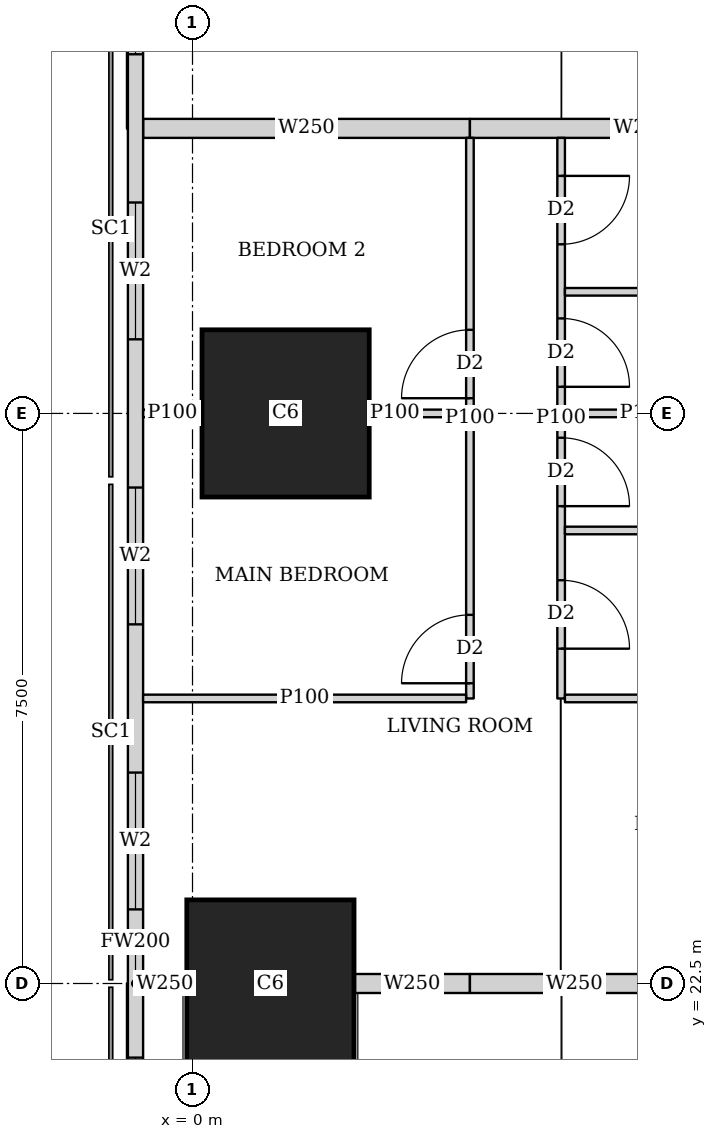
"""IFC4 building model, lengths in metres.
Left out: names, types, materials, properties, quantities, classifications, styles, units other than length and angle.
Written with IfcOpenShell. Run it as: python <this file> out.ifc"""

import sys

from ifc_helpers import new_model, si_unit, direction, frame, frame_2d, origin, origin_2d, place, context, subcontext, project, spatial, rectangle, extrude, element, fill, save


model = new_model("IFC4")
c1 = context("Model", 3, precision=1e-05, world=origin(), true_north=direction((0.0, 1.0)))
c2 = subcontext(c1, "Body", "Model", "MODEL_VIEW")
j1 = project(units=[si_unit("LENGTHUNIT", "METRE"), si_unit("PLANEANGLEUNIT", "RADIAN")], contexts=[c1])
p1 = place(None, origin())
s1 = spatial("IfcSite", under=j1, at=p1, CompositionType="ELEMENT")
p2 = place(p1, origin())
s2 = spatial("IfcBuilding", under=s1, at=p2, CompositionType="ELEMENT")
p3 = place(p2, frame((0.0, 0.0, 81.65)))
s3 = spatial("IfcBuildingStorey", under=s2, at=p3, CompositionType="ELEMENT", Elevation=81.65)
for number, where, z_axis, x_axis in (
    (1, (1.025, 22.5, 0.0), (0.0, 0.0, 1.0), (1.0, 0.0, 0.0)),
    (2, (1.225, 30.0, 0.0), (0.0, 0.0, 1.0), (1.0, 0.0, 0.0)),
):
    element("IfcColumn", number, at=place(p3, frame(where, z_axis=z_axis, x_axis=x_axis)), inside=s3, PredefinedType="COLUMN", context=c2, shape_type="SweptSolid", body=[
        extrude(rectangle(XDim=2.2, YDim=2.2, at=origin_2d()), origin(), (0.0, 0.0, 1.0), 3.75),
    ])
p4 = place(p3, frame((-0.75, 42.837, 0.0), z_axis=(0.0, 0.0, 1.0), x_axis=(0.0, -1.0, 0.0)))
e3 = element("IfcWall", 3, at=p4, inside=s3, PredefinedType="SOLIDWALL", context=c2, shape_type="SweptSolid", body=[
    extrude(rectangle(XDim=40.674, YDim=0.2, at=frame_2d((20.337, 0.0))), origin(), (0.0, 0.0, 1.0), 3.5),
])
p5 = place(p4, frame((1.78, 0.0, 0.9)))
e4 = element("IfcOpeningElement", 4, at=p5, cuts=e3, PredefinedType="OPENING", context=c2, shape_type="SweptSolid", body=[
    extrude(rectangle(XDim=1.8, YDim=1.5, at=frame_2d((0.9, 0.75))), frame((0.0, 0.11, 0.0), z_axis=(0.0, -1.0, 0.0), x_axis=(1.0, 0.0, 0.0)), (0.0, 0.0, 1.0), 0.22),
])
p6 = place(p4, frame((6.312, 0.0, 0.9)))
e5 = element("IfcOpeningElement", 5, at=p6, cuts=e3, PredefinedType="OPENING", context=c2, shape_type="SweptSolid", body=[
    extrude(rectangle(XDim=1.8, YDim=1.5, at=frame_2d((0.9, 0.75))), frame((0.0, 0.11, 0.0), z_axis=(0.0, -1.0, 0.0), x_axis=(1.0, 0.0, 0.0)), (0.0, 0.0, 1.0), 0.22),
])
p7 = place(p4, frame((10.062, 0.0, 0.9)))
e6 = element("IfcOpeningElement", 6, at=p7, cuts=e3, PredefinedType="OPENING", context=c2, shape_type="SweptSolid", body=[
    extrude(rectangle(XDim=1.8, YDim=1.5, at=frame_2d((0.9, 0.75))), frame((0.0, 0.11, 0.0), z_axis=(0.0, -1.0, 0.0), x_axis=(1.0, 0.0, 0.0)), (0.0, 0.0, 1.0), 0.22),
])
p8 = place(p4, frame((13.812, 0.0, 0.9)))
e7 = element("IfcOpeningElement", 7, at=p8, cuts=e3, PredefinedType="OPENING", context=c2, shape_type="SweptSolid", body=[
    extrude(rectangle(XDim=1.8, YDim=1.5, at=frame_2d((0.9, 0.75))), frame((0.0, 0.11, 0.0), z_axis=(0.0, -1.0, 0.0), x_axis=(1.0, 0.0, 0.0)), (0.0, 0.0, 1.0), 0.22),
])
p9 = place(p4, frame((17.562, 0.0, 0.9)))
e8 = element("IfcOpeningElement", 8, at=p9, cuts=e3, PredefinedType="OPENING", context=c2, shape_type="SweptSolid", body=[
    extrude(rectangle(XDim=1.8, YDim=1.5, at=frame_2d((0.9, 0.75))), frame((0.0, 0.11, 0.0), z_axis=(0.0, -1.0, 0.0), x_axis=(1.0, 0.0, 0.0)), (0.0, 0.0, 1.0), 0.22),
])
p10 = place(p4, frame((21.312, 0.0, 0.9)))
e9 = element("IfcOpeningElement", 9, at=p10, cuts=e3, PredefinedType="OPENING", context=c2, shape_type="SweptSolid", body=[
    extrude(rectangle(XDim=1.8, YDim=1.5, at=frame_2d((0.9, 0.75))), frame((0.0, 0.11, 0.0), z_axis=(0.0, -1.0, 0.0), x_axis=(1.0, 0.0, 0.0)), (0.0, 0.0, 1.0), 0.22),
])
p11 = place(p4, frame((25.062, 0.0, 0.9)))
e10 = element("IfcOpeningElement", 10, at=p11, cuts=e3, PredefinedType="OPENING", context=c2, shape_type="SweptSolid", body=[
    extrude(rectangle(XDim=1.8, YDim=1.5, at=frame_2d((0.9, 0.75))), frame((0.0, 0.11, 0.0), z_axis=(0.0, -1.0, 0.0), x_axis=(1.0, 0.0, 0.0)), (0.0, 0.0, 1.0), 0.22),
])
p12 = place(p4, frame((28.812, 0.0, 0.9)))
e11 = element("IfcOpeningElement", 11, at=p12, cuts=e3, PredefinedType="OPENING", context=c2, shape_type="SweptSolid", body=[
    extrude(rectangle(XDim=1.8, YDim=1.5, at=frame_2d((0.9, 0.75))), frame((0.0, 0.11, 0.0), z_axis=(0.0, -1.0, 0.0), x_axis=(1.0, 0.0, 0.0)), (0.0, 0.0, 1.0), 0.22),
])
p13 = place(p4, frame((32.562, 0.0, 0.9)))
e12 = element("IfcOpeningElement", 12, at=p13, cuts=e3, PredefinedType="OPENING", context=c2, shape_type="SweptSolid", body=[
    extrude(rectangle(XDim=1.8, YDim=1.5, at=frame_2d((0.9, 0.75))), frame((0.0, 0.11, 0.0), z_axis=(0.0, -1.0, 0.0), x_axis=(1.0, 0.0, 0.0)), (0.0, 0.0, 1.0), 0.22),
])
p14 = place(p4, frame((37.094, 0.0, 0.9)))
e13 = element("IfcOpeningElement", 13, at=p14, cuts=e3, PredefinedType="OPENING", context=c2, shape_type="SweptSolid", body=[
    extrude(rectangle(XDim=1.8, YDim=1.5, at=frame_2d((0.9, 0.75))), frame((0.0, 0.11, 0.0), z_axis=(0.0, -1.0, 0.0), x_axis=(1.0, 0.0, 0.0)), (0.0, 0.0, 1.0), 0.22),
])
p15 = place(p3, frame((3.65, 26.25, 0.0), z_axis=(0.0, 0.0, 1.0), x_axis=(0.0, 1.0, 0.0)))
e14 = element("IfcWall", 14, at=p15, inside=s3, PredefinedType="PARTITIONING", context=c2, shape_type="SweptSolid", body=[
    extrude(rectangle(XDim=7.375, YDim=0.1, at=frame_2d((3.688, 0.0))), origin(), (0.0, 0.0, 1.0), 3.5),
])
p16 = place(p15, frame((0.2, 0.0, 0.0)))
e15 = element("IfcOpeningElement", 15, at=p16, cuts=e14, PredefinedType="OPENING", context=c2, shape_type="SweptSolid", body=[
    extrude(rectangle(XDim=0.9, YDim=2.1, at=frame_2d((0.45, 1.05))), frame((0.0, 0.06, 0.0), z_axis=(0.0, -1.0, 0.0), x_axis=(1.0, 0.0, 0.0)), (0.0, 0.0, 1.0), 0.12),
])
p17 = place(p15, frame((3.95, 0.0, 0.0)))
e16 = element("IfcOpeningElement", 16, at=p17, cuts=e14, PredefinedType="OPENING", context=c2, shape_type="SweptSolid", body=[
    extrude(rectangle(XDim=0.9, YDim=2.1, at=frame_2d((0.45, 1.05))), frame((0.0, 0.06, 0.0), z_axis=(0.0, -1.0, 0.0), x_axis=(1.0, 0.0, 0.0)), (0.0, 0.0, 1.0), 0.12),
])
p18 = place(p3, frame((4.85, 26.25, 0.0), z_axis=(0.0, 0.0, 1.0), x_axis=(0.0, 1.0, 0.0)))
e17 = element("IfcWall", 17, at=p18, inside=s3, PredefinedType="PARTITIONING", context=c2, shape_type="SweptSolid", body=[
    extrude(rectangle(XDim=7.375, YDim=0.1, at=frame_2d((3.688, 0.0))), origin(), (0.0, 0.0, 1.0), 3.5),
])
p19 = place(p18, frame((0.655, 0.0, 0.0)))
e18 = element("IfcOpeningElement", 18, at=p19, cuts=e17, PredefinedType="OPENING", context=c2, shape_type="SweptSolid", body=[
    extrude(rectangle(XDim=0.9, YDim=2.1, at=frame_2d((0.45, 1.05))), frame((0.0, 0.06, 0.0), z_axis=(0.0, -1.0, 0.0), x_axis=(1.0, 0.0, 0.0)), (0.0, 0.0, 1.0), 0.12),
])
p20 = place(p18, frame((4.1, 0.0, 0.0)))
e19 = element("IfcOpeningElement", 19, at=p20, cuts=e17, PredefinedType="OPENING", context=c2, shape_type="SweptSolid", body=[
    extrude(rectangle(XDim=0.9, YDim=2.1, at=frame_2d((0.45, 1.05))), frame((0.0, 0.06, 0.0), z_axis=(0.0, -1.0, 0.0), x_axis=(1.0, 0.0, 0.0)), (0.0, 0.0, 1.0), 0.12),
])
p21 = place(p18, frame((2.53, 0.0, 0.0)))
e20 = element("IfcOpeningElement", 20, at=p21, cuts=e17, PredefinedType="OPENING", context=c2, shape_type="SweptSolid", body=[
    extrude(rectangle(XDim=0.9, YDim=2.1, at=frame_2d((0.45, 1.05))), frame((0.0, 0.06, 0.0), z_axis=(0.0, -1.0, 0.0), x_axis=(1.0, 0.0, 0.0)), (0.0, 0.0, 1.0), 0.12),
])
p22 = place(p18, frame((5.975, 0.0, 0.0)))
e21 = element("IfcOpeningElement", 21, at=p22, cuts=e17, PredefinedType="OPENING", context=c2, shape_type="SweptSolid", body=[
    extrude(rectangle(XDim=0.9, YDim=2.1, at=frame_2d((0.45, 1.05))), frame((0.0, 0.06, 0.0), z_axis=(0.0, -1.0, 0.0), x_axis=(1.0, 0.0, 0.0)), (0.0, 0.0, 1.0), 0.12),
])
p23 = place(p3, frame((-0.65, 26.25, 0.0), z_axis=(0.0, 0.0, 1.0), x_axis=(1.0, 0.0, 0.0)))
e22 = element("IfcWall", 22, at=p23, inside=s3, PredefinedType="PARTITIONING", context=c2, shape_type="SweptSolid", body=[
    extrude(rectangle(XDim=4.25, YDim=0.1, at=frame_2d((2.125, 0.0))), origin(), (0.0, 0.0, 1.0), 2.2),
])
p24 = place(p3, frame((-0.65, 30.0, 0.0), z_axis=(0.0, 0.0, 1.0), x_axis=(1.0, 0.0, 0.0)))
e23 = element("IfcWall", 23, at=p24, inside=s3, PredefinedType="PARTITIONING", context=c2, shape_type="SweptSolid", body=[
    extrude(rectangle(XDim=0.774, YDim=0.1, at=frame_2d((0.387, 0.0))), origin(), (0.0, 0.0, 1.0), 3.5),
])
p25 = place(p3, frame((2.326, 30.0, 0.0), z_axis=(0.0, 0.0, 1.0), x_axis=(1.0, 0.0, 0.0)))
e24 = element("IfcWall", 24, at=p25, inside=s3, PredefinedType="PARTITIONING", context=c2, shape_type="SweptSolid", body=[
    extrude(rectangle(XDim=1.274, YDim=0.1, at=frame_2d((0.637, 0.0))), origin(), (0.0, 0.0, 1.0), 3.5),
])
p26 = place(p3, frame((4.9, 26.25, 0.0), z_axis=(0.0, 0.0, 1.0), x_axis=(1.0, 0.0, 0.0)))
e25 = element("IfcWall", 25, at=p26, inside=s3, PredefinedType="PARTITIONING", context=c2, shape_type="SweptSolid", body=[
    extrude(rectangle(XDim=3.275, YDim=0.1, at=frame_2d((1.638, 0.0))), origin(), (0.0, 0.0, 1.0), 3.5),
])
p27 = place(p3, frame((4.9, 30.0, 0.0), z_axis=(0.0, 0.0, 1.0), x_axis=(1.0, 0.0, 0.0)))
e26 = element("IfcWall", 26, at=p27, inside=s3, PredefinedType="PARTITIONING", context=c2, shape_type="SweptSolid", body=[
    extrude(rectangle(XDim=1.499, YDim=0.1, at=frame_2d((0.75, 0.0))), origin(), (0.0, 0.0, 1.0), 3.5),
])
for number, where, z_axis, x_axis in (
    (27, (4.9, 28.46, 0.0), (0.0, 0.0, 1.0), (1.0, 0.0, 0.0)),
    (28, (4.9, 31.6, 0.0), (0.0, 0.0, 1.0), (1.0, 0.0, 0.0)),
):
    element("IfcWall", number, at=place(p3, frame(where, z_axis=z_axis, x_axis=x_axis)), inside=s3, PredefinedType="PARTITIONING", context=c2, shape_type="SweptSolid", body=[
        extrude(rectangle(XDim=3.275, YDim=0.1, at=frame_2d((1.638, 0.0))), origin(), (0.0, 0.0, 1.0), 3.5),
    ])
p28 = place(p3, frame((-0.65, 22.5, 0.0), z_axis=(0.0, 0.0, 1.0), x_axis=(1.0, 0.0, 0.0)))
e29 = element("IfcWall", 29, at=p28, inside=s3, PredefinedType="SOLIDWALL", context=c2, shape_type="SweptSolid", body=[
    extrude(rectangle(XDim=0.574, YDim=0.25, at=frame_2d((0.287, 0.0))), origin(), (0.0, 0.0, 1.0), 3.5),
])
p29 = place(p3, frame((2.126, 22.5, 0.0), z_axis=(0.0, 0.0, 1.0), x_axis=(1.0, 0.0, 0.0)))
e30 = element("IfcWall", 30, at=p29, inside=s3, PredefinedType="SOLIDWALL", context=c2, shape_type="SweptSolid", body=[
    extrude(rectangle(XDim=1.524, YDim=0.25, at=frame_2d((0.762, 0.0))), origin(), (0.0, 0.0, 1.0), 3.5),
])
p30 = place(p3, frame((3.65, 22.5, 0.0), z_axis=(0.0, 0.0, 1.0), x_axis=(1.0, 0.0, 0.0)))
e31 = element("IfcWall", 31, at=p30, inside=s3, PredefinedType="SOLIDWALL", context=c2, shape_type="SweptSolid", body=[
    extrude(rectangle(XDim=2.749, YDim=0.25, at=frame_2d((1.375, 0.0))), origin(), (0.0, 0.0, 1.0), 3.5),
])
p31 = place(p3, frame((-0.65, 33.75, 0.0), z_axis=(0.0, 0.0, 1.0), x_axis=(1.0, 0.0, 0.0)))
e32 = element("IfcWall", 32, at=p31, inside=s3, PredefinedType="SOLIDWALL", context=c2, shape_type="SweptSolid", body=[
    extrude(rectangle(XDim=4.3, YDim=0.25, at=frame_2d((2.15, 0.0))), origin(), (0.0, 0.0, 1.0), 2.2),
])
p32 = place(p3, frame((3.65, 33.75, 0.0), z_axis=(0.0, 0.0, 1.0), x_axis=(1.0, 0.0, 0.0)))
e33 = element("IfcWall", 33, at=p32, inside=s3, PredefinedType="SOLIDWALL", context=c2, shape_type="SweptSolid", body=[
    extrude(rectangle(XDim=4.525, YDim=0.25, at=frame_2d((2.263, 0.0))), origin(), (0.0, 0.0, 1.0), 3.5),
])
p33 = place(p6, origin())
e34 = element("IfcWindow", 34, at=p33, inside=s3, PartitioningType="SINGLE_PANEL", PredefinedType="WINDOW", context=c2, shape_type="SweptSolid", body=[
    extrude(rectangle(XDim=1.8, YDim=1.5, at=frame_2d((0.9, 0.75))), frame((0.0, 0.03, 0.0), z_axis=(0.0, -1.0, 0.0), x_axis=(1.0, 0.0, 0.0)), (0.0, 0.0, 1.0), 0.06),
])
fill(e5, e34)
p34 = place(p7, origin())
e35 = element("IfcWindow", 35, at=p34, inside=s3, PartitioningType="SINGLE_PANEL", PredefinedType="WINDOW", context=c2, shape_type="SweptSolid", body=[
    extrude(rectangle(XDim=1.8, YDim=1.5, at=frame_2d((0.9, 0.75))), frame((0.0, 0.03, 0.0), z_axis=(0.0, -1.0, 0.0), x_axis=(1.0, 0.0, 0.0)), (0.0, 0.0, 1.0), 0.06),
])
fill(e6, e35)
p35 = place(p8, origin())
e36 = element("IfcWindow", 36, at=p35, inside=s3, PartitioningType="SINGLE_PANEL", PredefinedType="WINDOW", context=c2, shape_type="SweptSolid", body=[
    extrude(rectangle(XDim=1.8, YDim=1.5, at=frame_2d((0.9, 0.75))), frame((0.0, 0.03, 0.0), z_axis=(0.0, -1.0, 0.0), x_axis=(1.0, 0.0, 0.0)), (0.0, 0.0, 1.0), 0.06),
])
fill(e7, e36)
p36 = place(p9, origin())
e37 = element("IfcWindow", 37, at=p36, inside=s3, PartitioningType="SINGLE_PANEL", PredefinedType="WINDOW", context=c2, shape_type="SweptSolid", body=[
    extrude(rectangle(XDim=1.8, YDim=1.5, at=frame_2d((0.9, 0.75))), frame((0.0, 0.03, 0.0), z_axis=(0.0, -1.0, 0.0), x_axis=(1.0, 0.0, 0.0)), (0.0, 0.0, 1.0), 0.06),
])
fill(e8, e37)
p37 = place(p10, origin())
e38 = element("IfcWindow", 38, at=p37, inside=s3, PartitioningType="SINGLE_PANEL", PredefinedType="WINDOW", context=c2, shape_type="SweptSolid", body=[
    extrude(rectangle(XDim=1.8, YDim=1.5, at=frame_2d((0.9, 0.75))), frame((0.0, 0.03, 0.0), z_axis=(0.0, -1.0, 0.0), x_axis=(1.0, 0.0, 0.0)), (0.0, 0.0, 1.0), 0.06),
])
fill(e9, e38)
p38 = place(p16, origin())
e39 = element("IfcDoor", 39, at=p38, inside=s3, OperationType="SINGLE_SWING_LEFT", PredefinedType="DOOR", context=c2, shape_type="SweptSolid", body=[
    extrude(rectangle(XDim=0.9, YDim=2.1, at=frame_2d((0.45, 1.05))), frame((0.0, 0.025, 0.0), z_axis=(0.0, -1.0, 0.0), x_axis=(1.0, 0.0, 0.0)), (0.0, 0.0, 1.0), 0.05),
])
fill(e15, e39)
p39 = place(p17, origin())
e40 = element("IfcDoor", 40, at=p39, inside=s3, OperationType="SINGLE_SWING_LEFT", PredefinedType="DOOR", context=c2, shape_type="SweptSolid", body=[
    extrude(rectangle(XDim=0.9, YDim=2.1, at=frame_2d((0.45, 1.05))), frame((0.0, 0.025, 0.0), z_axis=(0.0, -1.0, 0.0), x_axis=(1.0, 0.0, 0.0)), (0.0, 0.0, 1.0), 0.05),
])
fill(e16, e40)
p40 = place(p19, origin())
e41 = element("IfcDoor", 41, at=p40, inside=s3, OperationType="SINGLE_SWING_RIGHT", PredefinedType="DOOR", context=c2, shape_type="SweptSolid", body=[
    extrude(rectangle(XDim=0.9, YDim=2.1, at=frame_2d((0.45, 1.05))), frame((0.0, 0.025, 0.0), z_axis=(0.0, -1.0, 0.0), x_axis=(1.0, 0.0, 0.0)), (0.0, 0.0, 1.0), 0.05),
])
fill(e18, e41)
p41 = place(p20, origin())
e42 = element("IfcDoor", 42, at=p41, inside=s3, OperationType="SINGLE_SWING_RIGHT", PredefinedType="DOOR", context=c2, shape_type="SweptSolid", body=[
    extrude(rectangle(XDim=0.9, YDim=2.1, at=frame_2d((0.45, 1.05))), frame((0.0, 0.025, 0.0), z_axis=(0.0, -1.0, 0.0), x_axis=(1.0, 0.0, 0.0)), (0.0, 0.0, 1.0), 0.05),
])
fill(e19, e42)
p42 = place(p21, origin())
e43 = element("IfcDoor", 43, at=p42, inside=s3, OperationType="SINGLE_SWING_RIGHT", PredefinedType="DOOR", context=c2, shape_type="SweptSolid", body=[
    extrude(rectangle(XDim=0.9, YDim=2.1, at=frame_2d((0.45, 1.05))), frame((0.0, 0.025, 0.0), z_axis=(0.0, -1.0, 0.0), x_axis=(1.0, 0.0, 0.0)), (0.0, 0.0, 1.0), 0.05),
])
fill(e20, e43)
p43 = place(p22, origin())
e44 = element("IfcDoor", 44, at=p43, inside=s3, OperationType="SINGLE_SWING_LEFT", PredefinedType="DOOR", context=c2, shape_type="SweptSolid", body=[
    extrude(rectangle(XDim=0.9, YDim=2.1, at=frame_2d((0.45, 1.05))), frame((0.0, 0.025, 0.0), z_axis=(0.0, -1.0, 0.0), x_axis=(1.0, 0.0, 0.0)), (0.0, 0.0, 1.0), 0.05),
])
fill(e21, e44)
save(model, sys.argv[1])
